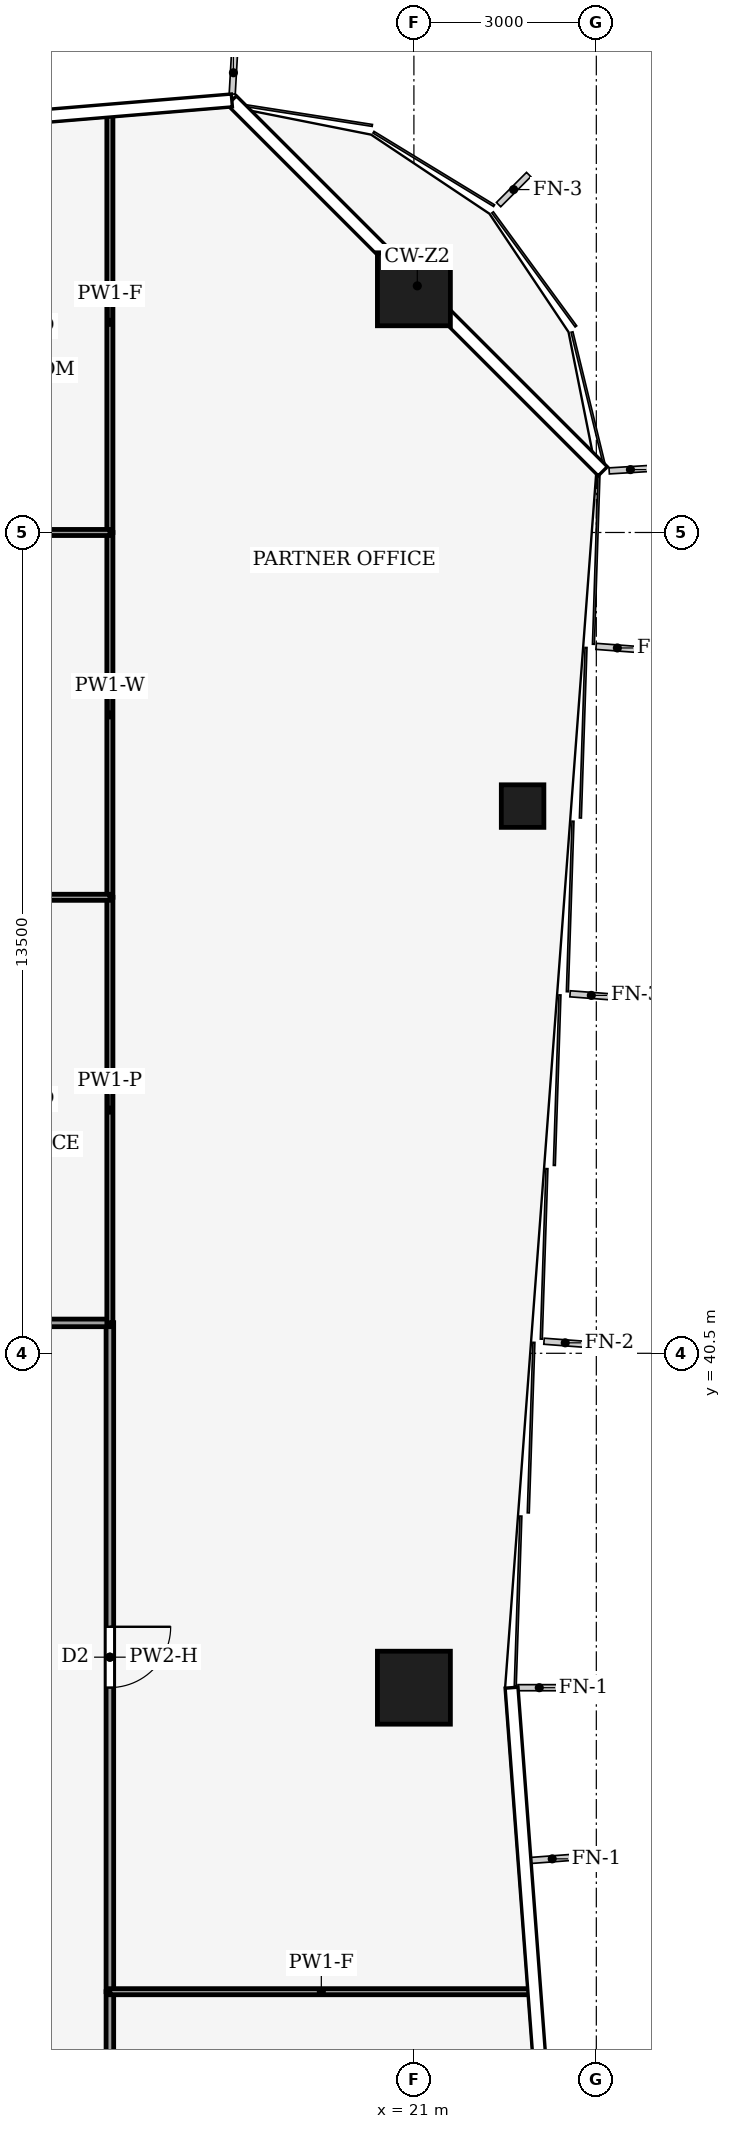
"""IFC4 building model, lengths in metres.
Left out: names, types, materials, properties, quantities, classifications, styles, units other than length and angle.
Written with IfcOpenShell. Run it as: python <this file> out.ifc"""

import sys

from ifc_helpers import new_model, si_unit, direction, frame, frame_2d, origin, origin_2d, place, context, subcontext, project, spatial, rectangle, hollow_rectangle, extrude, element, fill, save


model = new_model("IFC4")
c1 = context("Model", 3, precision=1e-05, world=origin(), true_north=direction((0.0, 1.0)))
c2 = subcontext(c1, "Body", "Model", "MODEL_VIEW")
j1 = project(units=[si_unit("LENGTHUNIT", "METRE"), si_unit("PLANEANGLEUNIT", "RADIAN")], contexts=[c1])
p1 = place(None, origin())
s1 = spatial("IfcSite", under=j1, at=p1, CompositionType="ELEMENT")
p2 = place(p1, origin())
s2 = spatial("IfcBuilding", under=s1, at=p2, CompositionType="ELEMENT")
p3 = place(p2, frame((0.0, 0.0, 162.0)))
s3 = spatial("IfcBuildingStorey", under=s2, at=p3, CompositionType="ELEMENT", Elevation=162.0)
for number, where, z_axis, x_axis in (
    (1, (21.0, 58.0, 0.0), (0.0, 0.0, 1.0), (1.0, 0.0, 0.0)),
    (2, (21.0, 35.0, 0.0), (0.0, 0.0, 1.0), (1.0, 0.0, 0.0)),
):
    element("IfcColumn", number, at=place(p3, frame(where, z_axis=z_axis, x_axis=x_axis)), inside=s3, PredefinedType="COLUMN", context=c2, shape_type="SweptSolid", body=[
        extrude(hollow_rectangle(XDim=1.2, YDim=1.2, WallThickness=0.07, at=origin_2d()), origin(), (0.0, 0.0, 1.0), 4.0),
    ])
p4 = place(p3, frame((22.788, 49.5, 0.0), z_axis=(0.0, 0.0, 1.0), x_axis=(1.0, 0.0, 0.0)))
e3 = element("IfcColumn", 3, at=p4, inside=s3, PredefinedType="COLUMN", context=c2, shape_type="SweptSolid", body=[
    extrude(hollow_rectangle(XDim=0.7, YDim=0.7, WallThickness=0.03, at=origin_2d()), origin(), (0.0, 0.0, 1.0), 4.0),
])
p5 = place(p3, frame((16.0, 30.0, 0.0), z_axis=(0.0, 0.0, 1.0), x_axis=(0.0, -1.0, 0.0)))
e4 = element("IfcWall", 4, at=p5, inside=s3, PredefinedType="PARTITIONING", context=c2, shape_type="SweptSolid", body=[
    extrude(rectangle(XDim=9.0, YDim=0.125, at=frame_2d((4.5, 0.0))), origin(), (0.0, 0.0, 1.0), 3.48),
])
p6 = place(p5, frame((4.0, 0.0, 0.0)))
e5 = element("IfcOpeningElement", 5, at=p6, cuts=e4, PredefinedType="OPENING", context=c2, shape_type="SweptSolid", body=[
    extrude(rectangle(XDim=1.0, YDim=2.1, at=frame_2d((0.5, 1.05))), frame((0.0, 0.073, 0.0), z_axis=(0.0, -1.0, 0.0), x_axis=(1.0, 0.0, 0.0)), (0.0, 0.0, 1.0), 0.145),
])
p7 = place(p3, frame((16.0, 41.004, 0.0), z_axis=(0.0, 0.0, 1.0), x_axis=(0.0, -1.0, 0.0)))
e6 = element("IfcWall", 6, at=p7, inside=s3, PredefinedType="PARTITIONING", context=c2, shape_type="SweptSolid", body=[
    extrude(rectangle(XDim=11.004, YDim=0.125, at=frame_2d((5.502, 0.0))), origin(), (0.0, 0.0, 1.0), 3.14),
])
p8 = place(p7, frame((5.002, 0.0, 0.0)))
e7 = element("IfcOpeningElement", 7, at=p8, cuts=e6, PredefinedType="OPENING", context=c2, shape_type="SweptSolid", body=[
    extrude(rectangle(XDim=1.0, YDim=2.1, at=frame_2d((0.5, 1.05))), frame((0.0, 0.073, 0.0), z_axis=(0.0, -1.0, 0.0), x_axis=(1.0, 0.0, 0.0)), (0.0, 0.0, 1.0), 0.145),
])
p9 = place(p3, frame((12.0, 41.0, 0.0), z_axis=(0.0, 0.0, 1.0), x_axis=(1.0, 0.0, 0.0)))
e8 = element("IfcWall", 8, at=p9, inside=s3, PredefinedType="PARTITIONING", context=c2, shape_type="SweptSolid", body=[
    extrude(rectangle(XDim=4.0, YDim=0.125, at=frame_2d((2.0, 0.0))), origin(), (0.0, 0.0, 1.0), 3.44),
])
p10 = place(p9, frame((1.5, 0.0, 0.0)))
e9 = element("IfcOpeningElement", 9, at=p10, cuts=e8, PredefinedType="OPENING", context=c2, shape_type="SweptSolid", body=[
    extrude(rectangle(XDim=1.0, YDim=2.1, at=frame_2d((0.5, 1.05))), frame((0.0, 0.073, 0.0), z_axis=(0.0, -1.0, 0.0), x_axis=(1.0, 0.0, 0.0)), (0.0, 0.0, 1.0), 0.145),
])
p11 = place(p3, frame((22.955, 30.0, 0.0), z_axis=(0.0, 0.0, 1.0), x_axis=(-1.0, 0.0, 0.0)))
e10 = element("IfcWall", 10, at=p11, inside=s3, PredefinedType="PARTITIONING", context=c2, shape_type="SweptSolid", body=[
    extrude(rectangle(XDim=6.955, YDim=0.1, at=frame_2d((3.478, 0.0))), origin(), (0.0, 0.0, 1.0), 3.04),
])
p12 = place(p3, frame((16.0, 48.0, 0.0), z_axis=(0.0, 0.0, 1.0), x_axis=(0.0, -1.0, 0.0)))
e11 = element("IfcWall", 11, at=p12, inside=s3, PredefinedType="PARTITIONING", context=c2, shape_type="SweptSolid", body=[
    extrude(rectangle(XDim=7.0, YDim=0.1, at=frame_2d((3.5, 0.0))), origin(), (0.0, 0.0, 1.0), 3.44),
])
p13 = place(p3, frame((16.0, 54.0, 0.0), z_axis=(0.0, 0.0, 1.0), x_axis=(0.0, -1.0, 0.0)))
e12 = element("IfcWall", 12, at=p13, inside=s3, PredefinedType="PARTITIONING", context=c2, shape_type="SweptSolid", body=[
    extrude(rectangle(XDim=6.0, YDim=0.1, at=frame_2d((3.0, 0.0))), origin(), (0.0, 0.0, 1.0), 3.24),
])
p14 = place(p3, frame((16.0, 60.913, 0.0), z_axis=(0.0, 0.0, 1.0), x_axis=(0.0, -1.0, 0.0)))
e13 = element("IfcWall", 13, at=p14, inside=s3, PredefinedType="PARTITIONING", context=c2, shape_type="SweptSolid", body=[
    extrude(rectangle(XDim=6.913, YDim=0.1, at=frame_2d((3.457, 0.0))), origin(), (0.0, 0.0, 1.0), 3.04),
])
p15 = place(p3, frame((16.0, 48.0, 0.0), z_axis=(0.0, 0.0, 1.0), x_axis=(-1.0, 0.0, 0.0)))
e14 = element("IfcWall", 14, at=p15, inside=s3, PredefinedType="PARTITIONING", context=c2, shape_type="SweptSolid", body=[
    extrude(rectangle(XDim=4.004, YDim=0.1, at=frame_2d((2.002, 0.0))), origin(), (0.0, 0.0, 1.0), 3.87),
])
p16 = place(p3, frame((12.0, 54.0, 0.0), z_axis=(0.0, 0.0, 1.0), x_axis=(1.0, 0.0, 0.0)))
e15 = element("IfcWall", 15, at=p16, inside=s3, PredefinedType="PARTITIONING", context=c2, shape_type="SweptSolid", body=[
    extrude(rectangle(XDim=4.0, YDim=0.1, at=frame_2d((2.0, 0.0))), origin(), (0.0, 0.0, 1.0), 3.87),
])
p17 = place(p16, frame((1.5, 0.0, 0.0)))
e16 = element("IfcOpeningElement", 16, at=p17, cuts=e15, PredefinedType="OPENING", context=c2, shape_type="SweptSolid", body=[
    extrude(rectangle(XDim=1.0, YDim=2.1, at=frame_2d((0.5, 1.05))), frame((0.0, 0.06, 0.0), z_axis=(0.0, -1.0, 0.0), x_axis=(1.0, 0.0, 0.0)), (0.0, 0.0, 1.0), 0.12),
])
p18 = place(p8, origin())
e17 = element("IfcDoor", 17, at=p18, inside=s3, OperationType="SINGLE_SWING_RIGHT", PredefinedType="DOOR", context=c2, shape_type="SweptSolid", body=[
    extrude(rectangle(XDim=1.0, YDim=2.1, at=frame_2d((0.5, 1.05))), frame((0.0, 0.025, 0.0), z_axis=(0.0, -1.0, 0.0), x_axis=(1.0, 0.0, 0.0)), (0.0, 0.0, 1.0), 0.05),
])
fill(e7, e17)
save(model, sys.argv[1])
